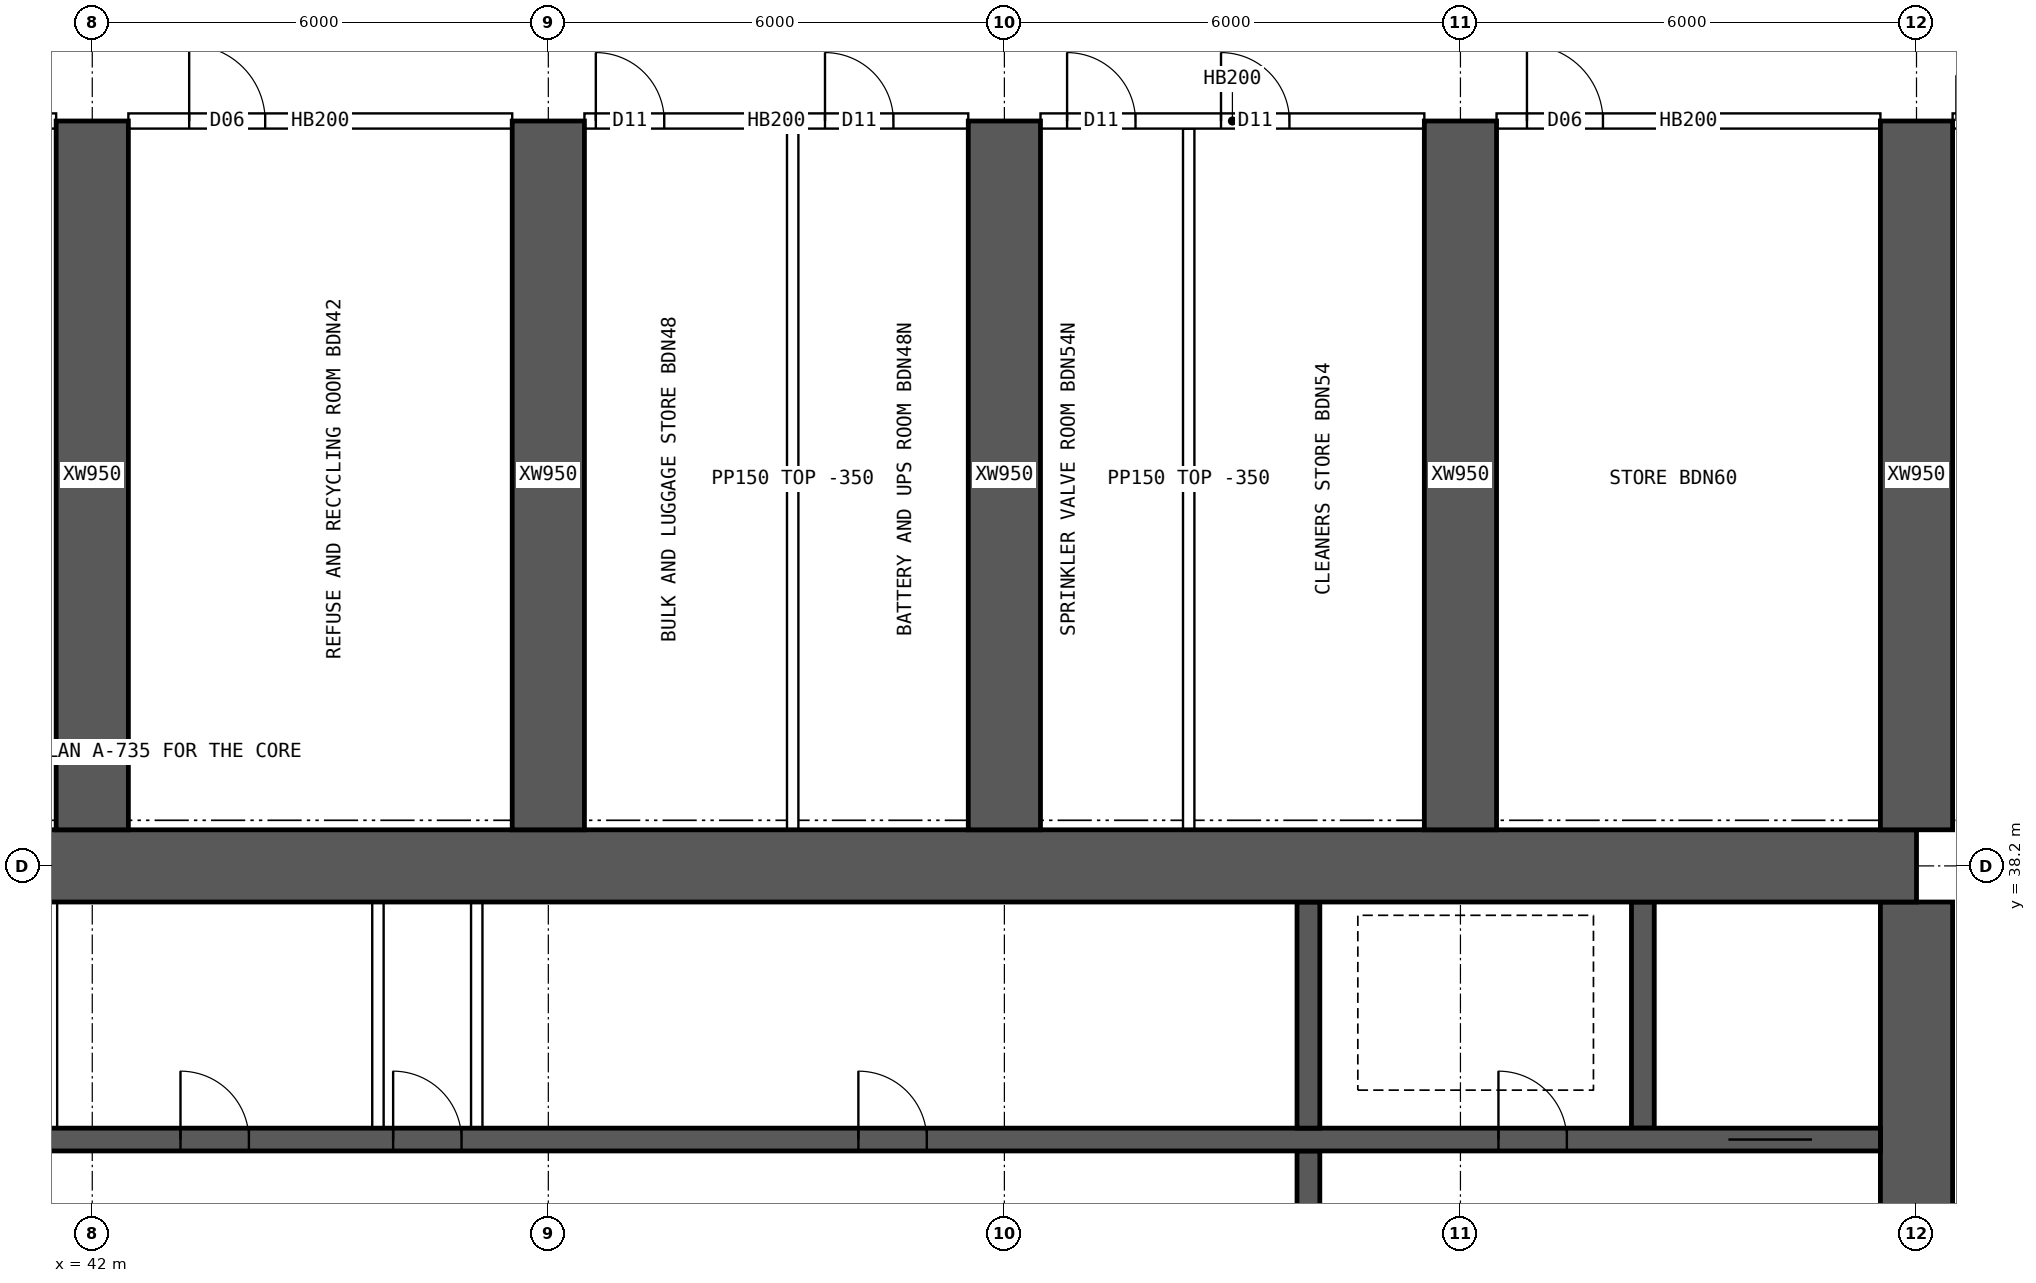
"""IFC4 building model, lengths in metres.
Left out: names, types, materials, properties, quantities, classifications, styles, units other than length and angle.
Written with IfcOpenShell. Run it as: python <this file> out.ifc"""

import sys

from ifc_helpers import new_model, si_unit, direction, frame, frame_2d, origin, place, context, subcontext, project, spatial, rectangle, extrude, element, fill, save


model = new_model("IFC4")
c1 = context("Model", 3, precision=1e-05, world=origin(), true_north=direction((0.0, 1.0)))
c2 = subcontext(c1, "Body", "Model", "MODEL_VIEW")
j1 = project(units=[si_unit("LENGTHUNIT", "METRE"), si_unit("PLANEANGLEUNIT", "RADIAN")], contexts=[c1])
p1 = place(None, origin())
s1 = spatial("IfcSite", under=j1, at=p1, CompositionType="ELEMENT")
p2 = place(p1, origin())
s2 = spatial("IfcBuilding", under=s1, at=p2, CompositionType="ELEMENT")
p3 = place(p2, frame((0.0, 0.0, 129.4)))
s3 = spatial("IfcBuildingStorey", under=s2, at=p3, CompositionType="ELEMENT", Elevation=129.4)
p4 = place(p3, frame((18.0, 38.2, 0.0), z_axis=(0.0, 0.0, 1.0), x_axis=(1.0, 0.0, 0.0)))
e1 = element("IfcWall", 1, at=p4, inside=s3, PredefinedType="SHEAR", context=c2, shape_type="SweptSolid", body=[
    extrude(rectangle(XDim=48.0, YDim=0.95, at=frame_2d((24.0, 0.0))), origin(), (0.0, 0.0, 1.0), 3.75),
])
p5 = place(p3, frame((66.0, 26.275, 0.0), z_axis=(0.0, 0.0, 1.0), x_axis=(0.0, 1.0, 0.0)))
e2 = element("IfcWall", 2, at=p5, inside=s3, PredefinedType="SHEAR", context=c2, shape_type="SweptSolid", body=[
    extrude(rectangle(XDim=11.45, YDim=0.95, at=frame_2d((5.725, 0.0))), origin(), (0.0, 0.0, 1.0), 3.75),
])
p6 = place(p5, frame((5.025, 0.0, 0.0)))
e3 = element("IfcOpeningElement", 3, at=p6, cuts=e2, PredefinedType="OPENING", context=c2, shape_type="SweptSolid", body=[
    extrude(rectangle(XDim=1.2, YDim=2.1, at=frame_2d((0.6, 1.05))), frame((0.0, 0.485, 0.0), z_axis=(0.0, -1.0, 0.0), x_axis=(1.0, 0.0, 0.0)), (0.0, 0.0, 1.0), 0.97),
])
p7 = place(p3, frame((18.475, 34.6, 0.0), z_axis=(0.0, 0.0, 1.0), x_axis=(1.0, 0.0, 0.0)))
e4 = element("IfcWall", 4, at=p7, inside=s3, PredefinedType="SHEAR", context=c2, shape_type="SweptSolid", body=[
    extrude(rectangle(XDim=47.05, YDim=0.3, at=frame_2d((23.525, 0.0))), origin(), (0.0, 0.0, 1.0), 3.75),
])
p8 = place(p7, frame((0.9, 0.0, 0.0)))
e5 = element("IfcOpeningElement", 5, at=p8, cuts=e4, PredefinedType="OPENING", context=c2, shape_type="SweptSolid", body=[
    extrude(rectangle(XDim=1.1, YDim=2.1, at=frame_2d((0.55, 1.05))), frame((0.0, 0.16, 0.0), z_axis=(0.0, -1.0, 0.0), x_axis=(1.0, 0.0, 0.0)), (0.0, 0.0, 1.0), 0.32),
])
p9 = place(p7, frame((45.05, 0.0, 0.0)))
e6 = element("IfcOpeningElement", 6, at=p9, cuts=e4, PredefinedType="OPENING", context=c2, shape_type="SweptSolid", body=[
    extrude(rectangle(XDim=1.1, YDim=2.1, at=frame_2d((0.55, 1.05))), frame((0.0, 0.16, 0.0), z_axis=(0.0, -1.0, 0.0), x_axis=(1.0, 0.0, 0.0)), (0.0, 0.0, 1.0), 0.32),
])
p10 = place(p7, frame((4.125, 0.0, 0.0)))
e7 = element("IfcOpeningElement", 7, at=p10, cuts=e4, PredefinedType="OPENING", context=c2, shape_type="SweptSolid", body=[
    extrude(rectangle(XDim=0.9, YDim=2.1, at=frame_2d((0.45, 1.05))), frame((0.0, 0.16, 0.0), z_axis=(0.0, -1.0, 0.0), x_axis=(1.0, 0.0, 0.0)), (0.0, 0.0, 1.0), 0.32),
])
p11 = place(p7, frame((42.025, 0.0, 0.0)))
e8 = element("IfcOpeningElement", 8, at=p11, cuts=e4, PredefinedType="OPENING", context=c2, shape_type="SweptSolid", body=[
    extrude(rectangle(XDim=0.9, YDim=2.1, at=frame_2d((0.45, 1.05))), frame((0.0, 0.16, 0.0), z_axis=(0.0, -1.0, 0.0), x_axis=(1.0, 0.0, 0.0)), (0.0, 0.0, 1.0), 0.32),
])
p12 = place(p7, frame((8.9, 0.0, 0.0)))
e9 = element("IfcOpeningElement", 9, at=p12, cuts=e4, PredefinedType="OPENING", context=c2, shape_type="SweptSolid", body=[
    extrude(rectangle(XDim=0.9, YDim=2.1, at=frame_2d((0.45, 1.05))), frame((0.0, 0.16, 0.0), z_axis=(0.0, -1.0, 0.0), x_axis=(1.0, 0.0, 0.0)), (0.0, 0.0, 1.0), 0.32),
])
p13 = place(p7, frame((12.874, 0.0, 0.0)))
e10 = element("IfcOpeningElement", 10, at=p13, cuts=e4, PredefinedType="OPENING", context=c2, shape_type="SweptSolid", body=[
    extrude(rectangle(XDim=0.9, YDim=2.1, at=frame_2d((0.45, 1.05))), frame((0.0, 0.16, 0.0), z_axis=(0.0, -1.0, 0.0), x_axis=(1.0, 0.0, 0.0)), (0.0, 0.0, 1.0), 0.32),
])
p14 = place(p7, frame((16.521, 0.0, 0.0)))
e11 = element("IfcOpeningElement", 11, at=p14, cuts=e4, PredefinedType="OPENING", context=c2, shape_type="SweptSolid", body=[
    extrude(rectangle(XDim=0.9, YDim=2.1, at=frame_2d((0.45, 1.05))), frame((0.0, 0.16, 0.0), z_axis=(0.0, -1.0, 0.0), x_axis=(1.0, 0.0, 0.0)), (0.0, 0.0, 1.0), 0.32),
])
p15 = place(p7, frame((20.28, 0.0, 0.0)))
e12 = element("IfcOpeningElement", 12, at=p15, cuts=e4, PredefinedType="OPENING", context=c2, shape_type="SweptSolid", body=[
    extrude(rectangle(XDim=0.9, YDim=2.1, at=frame_2d((0.45, 1.05))), frame((0.0, 0.16, 0.0), z_axis=(0.0, -1.0, 0.0), x_axis=(1.0, 0.0, 0.0)), (0.0, 0.0, 1.0), 0.32),
])
p16 = place(p7, frame((24.686, 0.0, 0.0)))
e13 = element("IfcOpeningElement", 13, at=p16, cuts=e4, PredefinedType="OPENING", context=c2, shape_type="SweptSolid", body=[
    extrude(rectangle(XDim=0.9, YDim=2.1, at=frame_2d((0.45, 1.05))), frame((0.0, 0.16, 0.0), z_axis=(0.0, -1.0, 0.0), x_axis=(1.0, 0.0, 0.0)), (0.0, 0.0, 1.0), 0.32),
])
p17 = place(p7, frame((27.483, 0.0, 0.0)))
e14 = element("IfcOpeningElement", 14, at=p17, cuts=e4, PredefinedType="OPENING", context=c2, shape_type="SweptSolid", body=[
    extrude(rectangle(XDim=0.9, YDim=2.1, at=frame_2d((0.45, 1.05))), frame((0.0, 0.16, 0.0), z_axis=(0.0, -1.0, 0.0), x_axis=(1.0, 0.0, 0.0)), (0.0, 0.0, 1.0), 0.32),
])
p18 = place(p7, frame((33.604, 0.0, 0.0)))
e15 = element("IfcOpeningElement", 15, at=p18, cuts=e4, PredefinedType="OPENING", context=c2, shape_type="SweptSolid", body=[
    extrude(rectangle(XDim=0.9, YDim=2.1, at=frame_2d((0.45, 1.05))), frame((0.0, 0.16, 0.0), z_axis=(0.0, -1.0, 0.0), x_axis=(1.0, 0.0, 0.0)), (0.0, 0.0, 1.0), 0.32),
])
p19 = place(p3, frame((58.0, 30.55, 0.0), z_axis=(0.0, 0.0, 1.0), x_axis=(0.0, 1.0, 0.0)))
e16 = element("IfcWall", 16, at=p19, inside=s3, PredefinedType="SHEAR", context=c2, shape_type="SweptSolid", body=[
    extrude(rectangle(XDim=3.9, YDim=0.3, at=frame_2d((1.95, 0.0))), origin(), (0.0, 0.0, 1.0), 3.75),
])
p20 = place(p19, frame((1.4, 0.0, 0.0)))
e17 = element("IfcOpeningElement", 17, at=p20, cuts=e16, PredefinedType="OPENING", context=c2, shape_type="SweptSolid", body=[
    extrude(rectangle(XDim=1.2, YDim=2.1, at=frame_2d((0.6, 1.05))), frame((0.0, 0.16, 0.0), z_axis=(0.0, -1.0, 0.0), x_axis=(1.0, 0.0, 0.0)), (0.0, 0.0, 1.0), 0.32),
])
for number, where, z_axis, x_axis in (
    (18, (62.4, 34.75, 0.0), (0.0, 0.0, 1.0), (0.0, 1.0, 0.0)),
    (19, (58.0, 34.75, 0.0), (0.0, 0.0, 1.0), (0.0, 1.0, 0.0)),
):
    element("IfcWall", number, at=place(p3, frame(where, z_axis=z_axis, x_axis=x_axis)), inside=s3, PredefinedType="SHEAR", context=c2, shape_type="SweptSolid", body=[
        extrude(rectangle(XDim=2.975, YDim=0.3, at=frame_2d((1.488, 0.0))), origin(), (0.0, 0.0, 1.0), 3.75),
    ])
for number, where, z_axis, x_axis in (
    (20, (42.0, 38.675, 0.0), (0.0, 0.0, 1.0), (0.0, 1.0, 0.0)),
    (21, (48.0, 38.675, 0.0), (0.0, 0.0, 1.0), (0.0, 1.0, 0.0)),
    (22, (54.0, 38.675, 0.0), (0.0, 0.0, 1.0), (0.0, 1.0, 0.0)),
    (23, (60.0, 38.675, 0.0), (0.0, 0.0, 1.0), (0.0, 1.0, 0.0)),
    (24, (66.0, 38.675, 0.0), (0.0, 0.0, 1.0), (0.0, 1.0, 0.0)),
):
    element("IfcWall", number, at=place(p3, frame(where, z_axis=z_axis, x_axis=x_axis)), inside=s3, PredefinedType="SHEAR", context=c2, shape_type="SweptSolid", body=[
        extrude(rectangle(XDim=9.325, YDim=0.95, at=frame_2d((4.663, 0.0))), origin(), (0.0, 0.0, 1.0), 3.75),
    ])
for number, where, z_axis, x_axis in (
    (25, (41.463, 34.75, 0.0), (0.0, 0.0, 1.0), (0.0, 1.0, 0.0)),
    (26, (45.758, 34.75, 0.0), (0.0, 0.0, 1.0), (0.0, 1.0, 0.0)),
    (27, (47.058, 34.75, 0.0), (0.0, 0.0, 1.0), (0.0, 1.0, 0.0)),
):
    element("IfcWall", number, at=place(p3, frame(where, z_axis=z_axis, x_axis=x_axis)), inside=s3, PredefinedType="SOLIDWALL", context=c2, shape_type="SweptSolid", body=[
        extrude(rectangle(XDim=2.975, YDim=0.15, at=frame_2d((1.488, 0.0))), origin(), (0.0, 0.0, 1.0), 3.4),
    ])
p21 = place(p3, frame((36.475, 48.0, 0.0), z_axis=(0.0, 0.0, 1.0), x_axis=(1.0, 0.0, 0.0)))
e28 = element("IfcWall", 28, at=p21, inside=s3, PredefinedType="SOLIDWALL", context=c2, shape_type="SweptSolid", body=[
    extrude(rectangle(XDim=5.05, YDim=0.2, at=frame_2d((2.525, 0.0))), origin(), (0.0, 0.0, 1.0), 3.4),
])
p22 = place(p21, frame((0.15, 0.0, 0.0)))
e29 = element("IfcOpeningElement", 29, at=p22, cuts=e28, PredefinedType="OPENING", context=c2, shape_type="SweptSolid", body=[
    extrude(rectangle(XDim=0.9, YDim=2.1, at=frame_2d((0.45, 1.05))), frame((0.0, 0.11, 0.0), z_axis=(0.0, -1.0, 0.0), x_axis=(1.0, 0.0, 0.0)), (0.0, 0.0, 1.0), 0.22),
])
p23 = place(p21, frame((3.555, 0.0, 0.0)))
e30 = element("IfcOpeningElement", 30, at=p23, cuts=e28, PredefinedType="OPENING", context=c2, shape_type="SweptSolid", body=[
    extrude(rectangle(XDim=0.9, YDim=2.1, at=frame_2d((0.45, 1.05))), frame((0.0, 0.11, 0.0), z_axis=(0.0, -1.0, 0.0), x_axis=(1.0, 0.0, 0.0)), (0.0, 0.0, 1.0), 0.22),
])
p24 = place(p3, frame((42.475, 48.0, 0.0), z_axis=(0.0, 0.0, 1.0), x_axis=(1.0, 0.0, 0.0)))
e31 = element("IfcWall", 31, at=p24, inside=s3, PredefinedType="SOLIDWALL", context=c2, shape_type="SweptSolid", body=[
    extrude(rectangle(XDim=5.05, YDim=0.2, at=frame_2d((2.525, 0.0))), origin(), (0.0, 0.0, 1.0), 3.4),
])
p25 = place(p24, frame((0.8, 0.0, 0.0)))
e32 = element("IfcOpeningElement", 32, at=p25, cuts=e31, PredefinedType="OPENING", context=c2, shape_type="SweptSolid", body=[
    extrude(rectangle(XDim=1.0, YDim=2.1, at=frame_2d((0.5, 1.05))), frame((0.0, 0.11, 0.0), z_axis=(0.0, -1.0, 0.0), x_axis=(1.0, 0.0, 0.0)), (0.0, 0.0, 1.0), 0.22),
])
p26 = place(p3, frame((48.475, 48.0, 0.0), z_axis=(0.0, 0.0, 1.0), x_axis=(1.0, 0.0, 0.0)))
e33 = element("IfcWall", 33, at=p26, inside=s3, PredefinedType="SOLIDWALL", context=c2, shape_type="SweptSolid", body=[
    extrude(rectangle(XDim=5.05, YDim=0.2, at=frame_2d((2.525, 0.0))), origin(), (0.0, 0.0, 1.0), 3.4),
])
p27 = place(p26, frame((0.15, 0.0, 0.0)))
e34 = element("IfcOpeningElement", 34, at=p27, cuts=e33, PredefinedType="OPENING", context=c2, shape_type="SweptSolid", body=[
    extrude(rectangle(XDim=0.9, YDim=2.1, at=frame_2d((0.45, 1.05))), frame((0.0, 0.11, 0.0), z_axis=(0.0, -1.0, 0.0), x_axis=(1.0, 0.0, 0.0)), (0.0, 0.0, 1.0), 0.22),
])
p28 = place(p26, frame((3.165, 0.0, 0.0)))
e35 = element("IfcOpeningElement", 35, at=p28, cuts=e33, PredefinedType="OPENING", context=c2, shape_type="SweptSolid", body=[
    extrude(rectangle(XDim=0.9, YDim=2.1, at=frame_2d((0.45, 1.05))), frame((0.0, 0.11, 0.0), z_axis=(0.0, -1.0, 0.0), x_axis=(1.0, 0.0, 0.0)), (0.0, 0.0, 1.0), 0.22),
])
p29 = place(p3, frame((54.475, 48.0, 0.0), z_axis=(0.0, 0.0, 1.0), x_axis=(1.0, 0.0, 0.0)))
e36 = element("IfcWall", 36, at=p29, inside=s3, PredefinedType="SOLIDWALL", context=c2, shape_type="SweptSolid", body=[
    extrude(rectangle(XDim=5.05, YDim=0.2, at=frame_2d((2.525, 0.0))), origin(), (0.0, 0.0, 1.0), 3.4),
])
p30 = place(p29, frame((0.35, 0.0, 0.0)))
e37 = element("IfcOpeningElement", 37, at=p30, cuts=e36, PredefinedType="OPENING", context=c2, shape_type="SweptSolid", body=[
    extrude(rectangle(XDim=0.9, YDim=2.1, at=frame_2d((0.45, 1.05))), frame((0.0, 0.11, 0.0), z_axis=(0.0, -1.0, 0.0), x_axis=(1.0, 0.0, 0.0)), (0.0, 0.0, 1.0), 0.22),
])
p31 = place(p29, frame((2.375, 0.0, 0.0)))
e38 = element("IfcOpeningElement", 38, at=p31, cuts=e36, PredefinedType="OPENING", context=c2, shape_type="SweptSolid", body=[
    extrude(rectangle(XDim=0.9, YDim=2.1, at=frame_2d((0.45, 1.05))), frame((0.0, 0.11, 0.0), z_axis=(0.0, -1.0, 0.0), x_axis=(1.0, 0.0, 0.0)), (0.0, 0.0, 1.0), 0.22),
])
p32 = place(p3, frame((60.475, 48.0, 0.0), z_axis=(0.0, 0.0, 1.0), x_axis=(1.0, 0.0, 0.0)))
e39 = element("IfcWall", 39, at=p32, inside=s3, PredefinedType="SOLIDWALL", context=c2, shape_type="SweptSolid", body=[
    extrude(rectangle(XDim=5.05, YDim=0.2, at=frame_2d((2.525, 0.0))), origin(), (0.0, 0.0, 1.0), 3.4),
])
p33 = place(p32, frame((0.4, 0.0, 0.0)))
e40 = element("IfcOpeningElement", 40, at=p33, cuts=e39, PredefinedType="OPENING", context=c2, shape_type="SweptSolid", body=[
    extrude(rectangle(XDim=1.0, YDim=2.1, at=frame_2d((0.5, 1.05))), frame((0.0, 0.11, 0.0), z_axis=(0.0, -1.0, 0.0), x_axis=(1.0, 0.0, 0.0)), (0.0, 0.0, 1.0), 0.22),
])
p34 = place(p3, frame((66.475, 48.0, 0.0), z_axis=(0.0, 0.0, 1.0), x_axis=(1.0, 0.0, 0.0)))
e41 = element("IfcWall", 41, at=p34, inside=s3, PredefinedType="SOLIDWALL", context=c2, shape_type="SweptSolid", body=[
    extrude(rectangle(XDim=1.925, YDim=0.2, at=frame_2d((0.962, 0.0))), origin(), (0.0, 0.0, 1.0), 3.4),
])
p35 = place(p34, frame((0.05, 0.0, 0.0)))
e42 = element("IfcOpeningElement", 42, at=p35, cuts=e41, PredefinedType="OPENING", context=c2, shape_type="SweptSolid", body=[
    extrude(rectangle(XDim=1.2, YDim=2.1, at=frame_2d((0.6, 1.05))), frame((0.0, 0.11, 0.0), z_axis=(0.0, -1.0, 0.0), x_axis=(1.0, 0.0, 0.0)), (0.0, 0.0, 1.0), 0.22),
])
for number, where, z_axis, x_axis in (
    (43, (51.215, 38.675, 0.0), (0.0, 0.0, 1.0), (0.0, 1.0, 0.0)),
    (44, (56.425, 38.675, 0.0), (0.0, 0.0, 1.0), (0.0, 1.0, 0.0)),
):
    element("IfcWall", number, at=place(p3, frame(where, z_axis=z_axis, x_axis=x_axis)), inside=s3, PredefinedType="PARTITIONING", context=c2, shape_type="SweptSolid", body=[
        extrude(rectangle(XDim=9.225, YDim=0.15, at=frame_2d((4.612, 0.0))), origin(), (0.0, 0.0, 1.0), 3.4),
    ])
p36 = place(p9, origin())
e45 = element("IfcDoor", 45, at=p36, inside=s3, OperationType="DOUBLE_DOOR_SLIDING", PredefinedType="DOOR", context=c2, shape_type="SweptSolid", body=[
    extrude(rectangle(XDim=1.1, YDim=2.1, at=frame_2d((0.55, 1.05))), frame((0.0, 0.025, 0.0), z_axis=(0.0, -1.0, 0.0), x_axis=(1.0, 0.0, 0.0)), (0.0, 0.0, 1.0), 0.05),
])
fill(e6, e45)
p37 = place(p11, origin())
e46 = element("IfcDoor", 46, at=p37, inside=s3, OperationType="SINGLE_SWING_LEFT", PredefinedType="DOOR", context=c2, shape_type="SweptSolid", body=[
    extrude(rectangle(XDim=0.9, YDim=2.1, at=frame_2d((0.45, 1.05))), frame((0.0, 0.025, 0.0), z_axis=(0.0, -1.0, 0.0), x_axis=(1.0, 0.0, 0.0)), (0.0, 0.0, 1.0), 0.05),
])
fill(e8, e46)
p38 = place(p16, origin())
e47 = element("IfcDoor", 47, at=p38, inside=s3, OperationType="SINGLE_SWING_LEFT", PredefinedType="DOOR", context=c2, shape_type="SweptSolid", body=[
    extrude(rectangle(XDim=0.9, YDim=2.1, at=frame_2d((0.45, 1.05))), frame((0.0, 0.025, 0.0), z_axis=(0.0, -1.0, 0.0), x_axis=(1.0, 0.0, 0.0)), (0.0, 0.0, 1.0), 0.05),
])
fill(e13, e47)
p39 = place(p17, origin())
e48 = element("IfcDoor", 48, at=p39, inside=s3, OperationType="SINGLE_SWING_LEFT", PredefinedType="DOOR", context=c2, shape_type="SweptSolid", body=[
    extrude(rectangle(XDim=0.9, YDim=2.1, at=frame_2d((0.45, 1.05))), frame((0.0, 0.025, 0.0), z_axis=(0.0, -1.0, 0.0), x_axis=(1.0, 0.0, 0.0)), (0.0, 0.0, 1.0), 0.05),
])
fill(e14, e48)
p40 = place(p18, origin())
e49 = element("IfcDoor", 49, at=p40, inside=s3, OperationType="SINGLE_SWING_LEFT", PredefinedType="DOOR", context=c2, shape_type="SweptSolid", body=[
    extrude(rectangle(XDim=0.9, YDim=2.1, at=frame_2d((0.45, 1.05))), frame((0.0, 0.025, 0.0), z_axis=(0.0, -1.0, 0.0), x_axis=(1.0, 0.0, 0.0)), (0.0, 0.0, 1.0), 0.05),
])
fill(e15, e49)
p41 = place(p25, origin())
e50 = element("IfcDoor", 50, at=p41, inside=s3, OperationType="SINGLE_SWING_LEFT", PredefinedType="DOOR", context=c2, shape_type="SweptSolid", body=[
    extrude(rectangle(XDim=1.0, YDim=2.1, at=frame_2d((0.5, 1.05))), frame((0.0, 0.025, 0.0), z_axis=(0.0, -1.0, 0.0), x_axis=(1.0, 0.0, 0.0)), (0.0, 0.0, 1.0), 0.05),
])
fill(e32, e50)
p42 = place(p27, origin())
e51 = element("IfcDoor", 51, at=p42, inside=s3, OperationType="SINGLE_SWING_LEFT", PredefinedType="DOOR", context=c2, shape_type="SweptSolid", body=[
    extrude(rectangle(XDim=0.9, YDim=2.1, at=frame_2d((0.45, 1.05))), frame((0.0, 0.025, 0.0), z_axis=(0.0, -1.0, 0.0), x_axis=(1.0, 0.0, 0.0)), (0.0, 0.0, 1.0), 0.05),
])
fill(e34, e51)
p43 = place(p28, origin())
e52 = element("IfcDoor", 52, at=p43, inside=s3, OperationType="SINGLE_SWING_LEFT", PredefinedType="DOOR", context=c2, shape_type="SweptSolid", body=[
    extrude(rectangle(XDim=0.9, YDim=2.1, at=frame_2d((0.45, 1.05))), frame((0.0, 0.025, 0.0), z_axis=(0.0, -1.0, 0.0), x_axis=(1.0, 0.0, 0.0)), (0.0, 0.0, 1.0), 0.05),
])
fill(e35, e52)
p44 = place(p30, origin())
e53 = element("IfcDoor", 53, at=p44, inside=s3, OperationType="SINGLE_SWING_LEFT", PredefinedType="DOOR", context=c2, shape_type="SweptSolid", body=[
    extrude(rectangle(XDim=0.9, YDim=2.1, at=frame_2d((0.45, 1.05))), frame((0.0, 0.025, 0.0), z_axis=(0.0, -1.0, 0.0), x_axis=(1.0, 0.0, 0.0)), (0.0, 0.0, 1.0), 0.05),
])
fill(e37, e53)
p45 = place(p31, origin())
e54 = element("IfcDoor", 54, at=p45, inside=s3, OperationType="SINGLE_SWING_LEFT", PredefinedType="DOOR", context=c2, shape_type="SweptSolid", body=[
    extrude(rectangle(XDim=0.9, YDim=2.1, at=frame_2d((0.45, 1.05))), frame((0.0, 0.025, 0.0), z_axis=(0.0, -1.0, 0.0), x_axis=(1.0, 0.0, 0.0)), (0.0, 0.0, 1.0), 0.05),
])
fill(e38, e54)
p46 = place(p33, origin())
e55 = element("IfcDoor", 55, at=p46, inside=s3, OperationType="SINGLE_SWING_LEFT", PredefinedType="DOOR", context=c2, shape_type="SweptSolid", body=[
    extrude(rectangle(XDim=1.0, YDim=2.1, at=frame_2d((0.5, 1.05))), frame((0.0, 0.025, 0.0), z_axis=(0.0, -1.0, 0.0), x_axis=(1.0, 0.0, 0.0)), (0.0, 0.0, 1.0), 0.05),
])
fill(e40, e55)
save(model, sys.argv[1])
